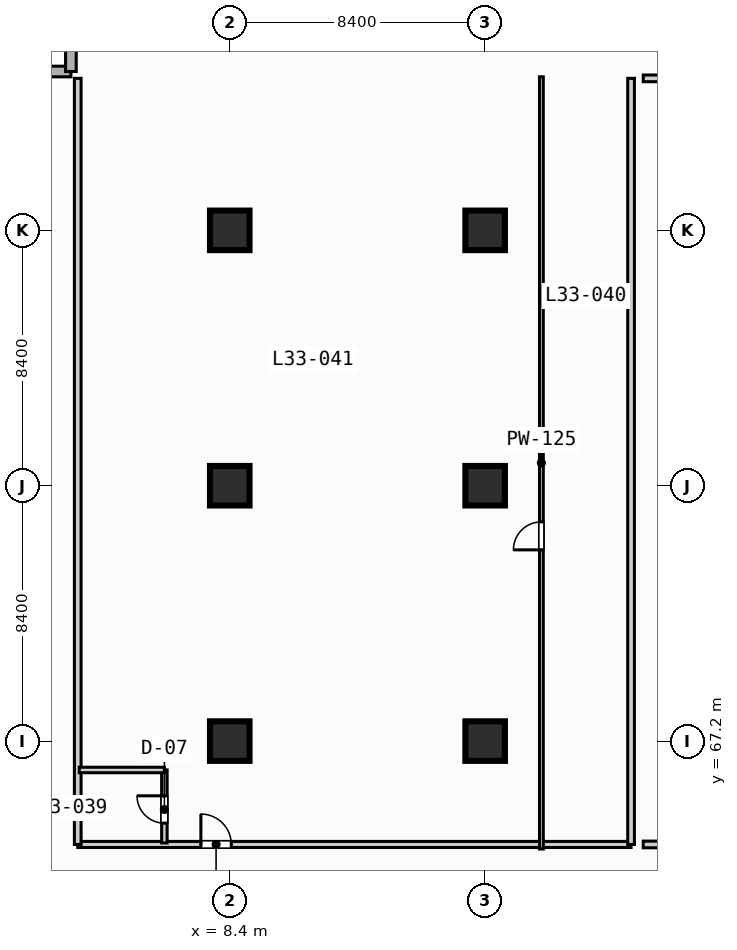
"""IFC4 building model, lengths in metres.
Left out: names, types, materials, properties, quantities, classifications, styles, units other than length and angle.
Written with IfcOpenShell. Run it as: python <this file> out.ifc"""

import sys

from ifc_helpers import new_model, si_unit, direction, frame, frame_2d, origin, origin_2d, place, context, subcontext, project, spatial, rectangle, extrude, element, fill, save


model = new_model("IFC4")
c1 = context("Model", 3, precision=1e-05, world=origin(), true_north=direction((0.0, 1.0)))
c2 = subcontext(c1, "Body", "Model", "MODEL_VIEW")
j1 = project(units=[si_unit("LENGTHUNIT", "METRE"), si_unit("PLANEANGLEUNIT", "RADIAN")], contexts=[c1])
p1 = place(None, origin())
s1 = spatial("IfcSite", under=j1, at=p1, CompositionType="ELEMENT")
p2 = place(p1, origin())
s2 = spatial("IfcBuilding", under=s1, at=p2, CompositionType="ELEMENT")
p3 = place(p2, frame((0.0, 0.0, 138.0)))
s3 = spatial("IfcBuildingStorey", under=s2, at=p3, CompositionType="ELEMENT", Elevation=138.0)
for number, where, z_axis, x_axis in (
    (1, (8.4, 67.2, 0.0), (0.0, 0.0, 1.0), (1.0, 0.0, 0.0)),
    (2, (8.4, 75.6, 0.0), (0.0, 0.0, 1.0), (1.0, 0.0, 0.0)),
    (3, (8.4, 84.0, 0.0), (0.0, 0.0, 1.0), (1.0, 0.0, 0.0)),
    (4, (16.8, 67.2, 0.0), (0.0, 0.0, 1.0), (1.0, 0.0, 0.0)),
    (5, (16.8, 75.6, 0.0), (0.0, 0.0, 1.0), (1.0, 0.0, 0.0)),
    (6, (16.8, 84.0, 0.0), (0.0, 0.0, 1.0), (1.0, 0.0, 0.0)),
):
    element("IfcColumn", number, at=place(p3, frame(where, z_axis=z_axis, x_axis=x_axis)), inside=s3, PredefinedType="COLUMN", context=c2, shape_type="SweptSolid", body=[
        extrude(rectangle(XDim=1.3, YDim=1.3, at=origin_2d()), origin(), (0.0, 0.0, 1.0), 3.8),
    ])
for number, where, z_axis, x_axis in (
    (7, (0.175, 89.225, 0.0), (0.0, 0.0, 1.0), (1.0, 0.0, 0.0)),
    (8, (3.175, 89.225, 0.0), (0.0, 0.0, 1.0), (0.0, 1.0, 0.0)),
):
    element("IfcWall", number, at=place(p3, frame(where, z_axis=z_axis, x_axis=x_axis)), inside=s3, PredefinedType="STANDARD", context=c2, shape_type="SweptSolid", body=[
        extrude(rectangle(XDim=3.0, YDim=0.35, at=frame_2d((1.5, 0.0))), origin(), (0.0, 0.0, 1.0), 3.55),
    ])
p4 = place(p3, frame((3.4, 63.8, 0.0), z_axis=(0.0, 0.0, 1.0), x_axis=(1.0, 0.0, 0.0)))
e9 = element("IfcWall", 9, at=p4, inside=s3, PredefinedType="PARTITIONING", context=c2, shape_type="SweptSolid", body=[
    extrude(rectangle(XDim=18.2, YDim=0.2, at=frame_2d((9.1, 0.0))), origin(), (0.0, 0.0, 1.0), 3.55),
])
p5 = place(p4, frame((4.05, 0.0, 0.0)))
e10 = element("IfcOpeningElement", 10, at=p5, cuts=e9, PredefinedType="OPENING", context=c2, shape_type="SweptSolid", body=[
    extrude(rectangle(XDim=1.0, YDim=2.15, at=frame_2d((0.5, 1.075))), frame((0.0, 0.11, 0.0), z_axis=(0.0, -1.0, 0.0), x_axis=(1.0, 0.0, 0.0)), (0.0, 0.0, 1.0), 0.22),
])
for number, where, z_axis, x_axis in (
    (11, (21.6, 63.8, 0.0), (0.0, 0.0, 1.0), (0.0, 1.0, 0.0)),
    (12, (3.4, 63.8, 0.0), (0.0, 0.0, 1.0), (0.0, 1.0, 0.0)),
):
    element("IfcWall", number, at=place(p3, frame(where, z_axis=z_axis, x_axis=x_axis)), inside=s3, PredefinedType="PARTITIONING", context=c2, shape_type="SweptSolid", body=[
        extrude(rectangle(XDim=25.2, YDim=0.22, at=frame_2d((12.6, 0.0))), origin(), (0.0, 0.0, 1.0), 3.55),
    ])
p6 = place(p3, frame((6.25, 63.85, 0.0), z_axis=(0.0, 0.0, 1.0), x_axis=(0.0, 1.0, 0.0)))
e13 = element("IfcWall", 13, at=p6, inside=s3, PredefinedType="PLUMBINGWALL", context=c2, shape_type="SweptSolid", body=[
    extrude(rectangle(XDim=2.4, YDim=0.18, at=frame_2d((1.2, 0.0))), origin(), (0.0, 0.0, 1.0), 3.55),
])
p7 = place(p6, frame((0.65, 0.0, 0.0)))
e14 = element("IfcOpeningElement", 14, at=p7, cuts=e13, PredefinedType="OPENING", context=c2, shape_type="SweptSolid", body=[
    extrude(rectangle(XDim=0.9, YDim=2.1, at=frame_2d((0.45, 1.05))), frame((0.0, 0.1, 0.0), z_axis=(0.0, -1.0, 0.0), x_axis=(1.0, 0.0, 0.0)), (0.0, 0.0, 1.0), 0.2),
])
p8 = place(p3, frame((3.45, 66.25, 0.0), z_axis=(0.0, 0.0, 1.0), x_axis=(1.0, 0.0, 0.0)))
e15 = element("IfcWall", 15, at=p8, inside=s3, PredefinedType="PLUMBINGWALL", context=c2, shape_type="SweptSolid", body=[
    extrude(rectangle(XDim=2.8, YDim=0.18, at=frame_2d((1.4, 0.0))), origin(), (0.0, 0.0, 1.0), 3.55),
])
p9 = place(p3, frame((18.65, 63.65, 0.0), z_axis=(0.0, 0.0, 1.0), x_axis=(0.0, 1.0, 0.0)))
e16 = element("IfcWall", 16, at=p9, inside=s3, PredefinedType="PARTITIONING", context=c2, shape_type="SweptSolid", body=[
    extrude(rectangle(XDim=25.4, YDim=0.125, at=frame_2d((12.7, 0.0))), origin(), (0.0, 0.0, 1.0), 3.55),
])
p10 = place(p9, frame((9.84, 0.0, 0.0)))
e17 = element("IfcOpeningElement", 17, at=p10, cuts=e16, PredefinedType="OPENING", context=c2, shape_type="SweptSolid", body=[
    extrude(rectangle(XDim=0.92, YDim=2.1, at=frame_2d((0.46, 1.05))), frame((0.0, 0.073, 0.0), z_axis=(0.0, -1.0, 0.0), x_axis=(1.0, 0.0, 0.0)), (0.0, 0.0, 1.0), 0.145),
])
p11 = place(p3, frame((22.0, 89.0, 0.0), z_axis=(0.0, 0.0, 1.0), x_axis=(1.0, 0.0, 0.0)))
e18 = element("IfcWall", 18, at=p11, inside=s3, PredefinedType="PARTITIONING", context=c2, shape_type="SweptSolid", body=[
    extrude(rectangle(XDim=11.3, YDim=0.22, at=frame_2d((5.65, 0.0))), origin(), (0.0, 0.0, 1.0), 3.55),
])
p12 = place(p3, frame((22.0, 63.8, 0.0), z_axis=(0.0, 0.0, 1.0), x_axis=(1.0, 0.0, 0.0)))
e19 = element("IfcWall", 19, at=p12, inside=s3, PredefinedType="PARTITIONING", context=c2, shape_type="SweptSolid", body=[
    extrude(rectangle(XDim=6.0, YDim=0.22, at=frame_2d((3.0, 0.0))), origin(), (0.0, 0.0, 1.0), 3.55),
])
p13 = place(p5, origin())
e20 = element("IfcDoor", 20, at=p13, inside=s3, OperationType="SINGLE_SWING_LEFT", PredefinedType="DOOR", context=c2, shape_type="SweptSolid", body=[
    extrude(rectangle(XDim=1.0, YDim=2.15, at=frame_2d((0.5, 1.075))), frame((0.0, 0.025, 0.0), z_axis=(0.0, -1.0, 0.0), x_axis=(1.0, 0.0, 0.0)), (0.0, 0.0, 1.0), 0.05),
])
fill(e10, e20)
p14 = place(p7, origin())
e21 = element("IfcDoor", 21, at=p14, inside=s3, OperationType="SINGLE_SWING_RIGHT", PredefinedType="DOOR", context=c2, shape_type="SweptSolid", body=[
    extrude(rectangle(XDim=0.9, YDim=2.1, at=frame_2d((0.45, 1.05))), frame((0.0, 0.025, 0.0), z_axis=(0.0, -1.0, 0.0), x_axis=(1.0, 0.0, 0.0)), (0.0, 0.0, 1.0), 0.05),
])
fill(e14, e21)
p15 = place(p10, origin())
e22 = element("IfcDoor", 22, at=p15, inside=s3, OperationType="SINGLE_SWING_LEFT", PredefinedType="DOOR", context=c2, shape_type="SweptSolid", body=[
    extrude(rectangle(XDim=0.92, YDim=2.1, at=frame_2d((0.46, 1.05))), frame((0.0, 0.025, 0.0), z_axis=(0.0, -1.0, 0.0), x_axis=(1.0, 0.0, 0.0)), (0.0, 0.0, 1.0), 0.05),
])
fill(e17, e22)
save(model, sys.argv[1])
